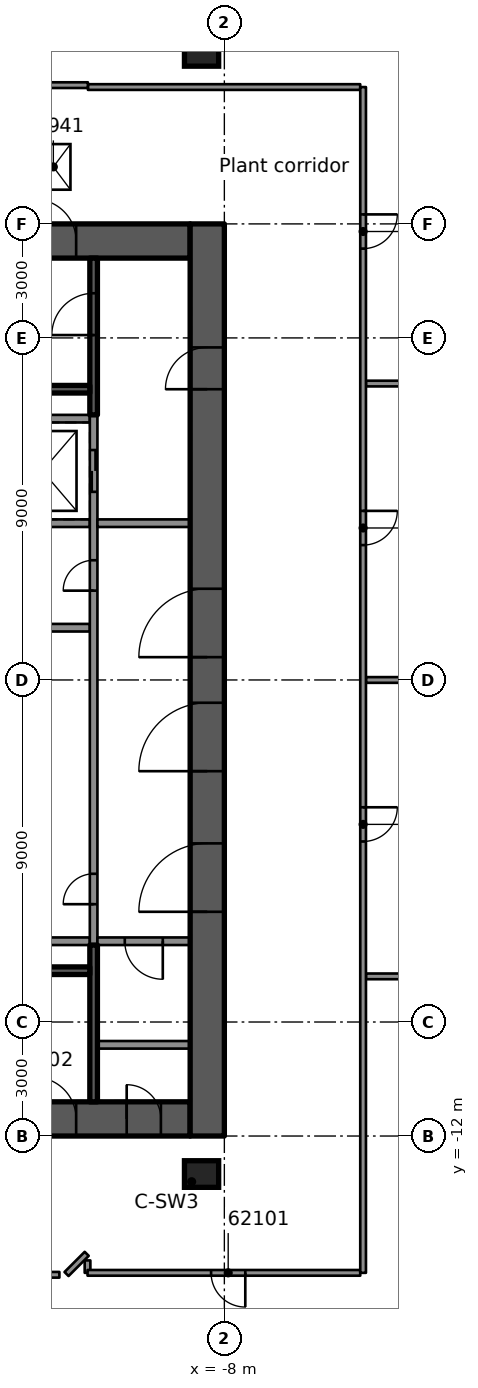
"""IFC4 building model, lengths in metres.
Left out: names, types, materials, properties, quantities, classifications, styles, units other than length and angle.
Written with IfcOpenShell. Run it as: python <this file> out.ifc"""

import sys

from ifc_helpers import new_model, si_unit, direction, frame, frame_2d, origin, origin_2d, place, context, subcontext, project, spatial, rectangle, extrude, element, fill, save


model = new_model("IFC4")
c1 = context("Model", 3, precision=1e-05, world=origin(), true_north=direction((0.0, 1.0)))
c2 = subcontext(c1, "Body", "Model", "MODEL_VIEW")
j1 = project(units=[si_unit("LENGTHUNIT", "METRE"), si_unit("PLANEANGLEUNIT", "RADIAN")], contexts=[c1])
p1 = place(None, origin())
s1 = spatial("IfcSite", under=j1, at=p1, CompositionType="ELEMENT")
p2 = place(p1, origin())
s2 = spatial("IfcBuilding", under=s1, at=p2, CompositionType="ELEMENT")
p3 = place(p2, frame((0.0, 0.0, 299.9)))
s3 = spatial("IfcBuildingStorey", under=s2, at=p3, CompositionType="ELEMENT", Elevation=299.9)
p4 = place(p3, frame((-18.1, 11.55, 0.0), z_axis=(0.0, 0.0, 1.0), x_axis=(1.0, 0.0, 0.0)))
e1 = element("IfcWall", 1, at=p4, inside=s3, PredefinedType="SHEAR", context=c2, shape_type="SweptSolid", body=[
    extrude(rectangle(XDim=9.2, YDim=0.9, at=frame_2d((4.6, 0.0))), origin(), (0.0, 0.0, 1.0), 4.4),
])
p5 = place(p4, frame((5.1, 0.0, 0.0)))
e2 = element("IfcOpeningElement", 2, at=p5, cuts=e1, PredefinedType="OPENING", context=c2, shape_type="SweptSolid", body=[
    extrude(rectangle(XDim=1.1, YDim=2.1, at=frame_2d((0.55, 1.05))), frame((0.0, 0.46, 0.0), z_axis=(0.0, -1.0, 0.0), x_axis=(1.0, 0.0, 0.0)), (0.0, 0.0, 1.0), 0.92),
])
p6 = place(p3, frame((-18.1, -11.55, 0.0), z_axis=(0.0, 0.0, 1.0), x_axis=(1.0, 0.0, 0.0)))
e3 = element("IfcWall", 3, at=p6, inside=s3, PredefinedType="SHEAR", context=c2, shape_type="SweptSolid", body=[
    extrude(rectangle(XDim=9.2, YDim=0.9, at=frame_2d((4.6, 0.0))), origin(), (0.0, 0.0, 1.0), 4.4),
])
p7 = place(p6, frame((5.1, 0.0, 0.0)))
e4 = element("IfcOpeningElement", 4, at=p7, cuts=e3, PredefinedType="OPENING", context=c2, shape_type="SweptSolid", body=[
    extrude(rectangle(XDim=1.1, YDim=2.1, at=frame_2d((0.55, 1.05))), frame((0.0, 0.46, 0.0), z_axis=(0.0, -1.0, 0.0), x_axis=(1.0, 0.0, 0.0)), (0.0, 0.0, 1.0), 0.92),
])
p8 = place(p6, frame((7.53, 0.0, 0.0)))
e5 = element("IfcOpeningElement", 5, at=p8, cuts=e3, PredefinedType="OPENING", context=c2, shape_type="SweptSolid", body=[
    extrude(rectangle(XDim=0.9, YDim=2.1, at=frame_2d((0.45, 1.05))), frame((0.0, 0.46, 0.0), z_axis=(0.0, -1.0, 0.0), x_axis=(1.0, 0.0, 0.0)), (0.0, 0.0, 1.0), 0.92),
])
p9 = place(p3, frame((-8.45, -12.0, 0.0), z_axis=(0.0, 0.0, 1.0), x_axis=(0.0, 1.0, 0.0)))
e6 = element("IfcWall", 6, at=p9, inside=s3, PredefinedType="SHEAR", context=c2, shape_type="SweptSolid", body=[
    extrude(rectangle(XDim=24.0, YDim=0.9, at=frame_2d((12.0, 0.0))), origin(), (0.0, 0.0, 1.0), 4.4),
])
p10 = place(p9, frame((9.6, 0.0, 0.0)))
e7 = element("IfcOpeningElement", 7, at=p10, cuts=e6, PredefinedType="OPENING", context=c2, shape_type="SweptSolid", body=[
    extrude(rectangle(XDim=1.8, YDim=2.1, at=frame_2d((0.9, 1.05))), frame((0.0, 0.46, 0.0), z_axis=(0.0, -1.0, 0.0), x_axis=(1.0, 0.0, 0.0)), (0.0, 0.0, 1.0), 0.92),
])
p11 = place(p9, frame((5.9, 0.0, 0.0)))
e8 = element("IfcOpeningElement", 8, at=p11, cuts=e6, PredefinedType="OPENING", context=c2, shape_type="SweptSolid", body=[
    extrude(rectangle(XDim=1.8, YDim=2.1, at=frame_2d((0.9, 1.05))), frame((0.0, 0.46, 0.0), z_axis=(0.0, -1.0, 0.0), x_axis=(1.0, 0.0, 0.0)), (0.0, 0.0, 1.0), 0.92),
])
p12 = place(p9, frame((12.6, 0.0, 0.0)))
e9 = element("IfcOpeningElement", 9, at=p12, cuts=e6, PredefinedType="OPENING", context=c2, shape_type="SweptSolid", body=[
    extrude(rectangle(XDim=1.8, YDim=2.1, at=frame_2d((0.9, 1.05))), frame((0.0, 0.46, 0.0), z_axis=(0.0, -1.0, 0.0), x_axis=(1.0, 0.0, 0.0)), (0.0, 0.0, 1.0), 0.92),
])
p13 = place(p9, frame((19.65, 0.0, 0.0)))
e10 = element("IfcOpeningElement", 10, at=p13, cuts=e6, PredefinedType="OPENING", context=c2, shape_type="SweptSolid", body=[
    extrude(rectangle(XDim=1.1, YDim=2.1, at=frame_2d((0.55, 1.05))), frame((0.0, 0.46, 0.0), z_axis=(0.0, -1.0, 0.0), x_axis=(1.0, 0.0, 0.0)), (0.0, 0.0, 1.0), 0.92),
])
for number, where, z_axis, x_axis in (
    (11, (-8.6, 16.5, 0.0), (0.0, 0.0, 1.0), (1.0, 0.0, 0.0)),
    (12, (-8.6, -13.0, 0.0), (0.0, 0.0, 1.0), (1.0, 0.0, 0.0)),
):
    element("IfcColumn", number, at=place(p3, frame(where, z_axis=z_axis, x_axis=x_axis)), inside=s3, PredefinedType="COLUMN", context=c2, shape_type="SweptSolid", body=[
        extrude(rectangle(XDim=0.9, YDim=0.7, at=origin_2d()), origin(), (0.0, 0.0, 1.0), 4.4),
    ])
for number, where, z_axis, x_axis in (
    (13, (-11.54, 6.875, 0.0), (0.0, 0.0, 1.0), (-1.0, 0.0, 0.0)),
    (14, (-11.54, -6.875, 0.0), (0.0, 0.0, 1.0), (-1.0, 0.0, 0.0)),
):
    element("IfcWall", number, at=place(p3, frame(where, z_axis=z_axis, x_axis=x_axis)), inside=s3, PredefinedType="SOLIDWALL", context=c2, shape_type="SweptSolid", body=[
        extrude(rectangle(XDim=6.56, YDim=0.2, at=frame_2d((3.28, 0.0))), origin(), (0.0, 0.0, 1.0), 3.98),
    ])
p14 = place(p3, frame((-11.54, 1.375, 0.0), z_axis=(0.0, 0.0, 1.0), x_axis=(-1.0, 0.0, 0.0)))
e15 = element("IfcWall", 15, at=p14, inside=s3, PredefinedType="SOLIDWALL", context=c2, shape_type="SweptSolid", body=[
    extrude(rectangle(XDim=4.2, YDim=0.2, at=frame_2d((2.1, 0.0))), origin(), (0.0, 0.0, 1.0), 3.98),
])
p15 = place(p3, frame((-11.54, 4.125, 0.0), z_axis=(0.0, 0.0, 1.0), x_axis=(-1.0, 0.0, 0.0)))
e16 = element("IfcWall", 16, at=p15, inside=s3, PredefinedType="SOLIDWALL", context=c2, shape_type="SweptSolid", body=[
    extrude(rectangle(XDim=2.5, YDim=0.2, at=frame_2d((1.25, 0.0))), origin(), (0.0, 0.0, 1.0), 3.98),
])
p16 = place(p3, frame((-11.44, -6.975, 0.0), z_axis=(0.0, 0.0, 1.0), x_axis=(0.0, 1.0, 0.0)))
e17 = element("IfcWall", 17, at=p16, inside=s3, PredefinedType="SOLIDWALL", context=c2, shape_type="SweptSolid", body=[
    extrude(rectangle(XDim=13.95, YDim=0.2, at=frame_2d((6.975, 0.0))), origin(), (0.0, 0.0, 1.0), 3.98),
])
p17 = place(p16, frame((11.925, 0.0, 0.0)))
e18 = element("IfcOpeningElement", 18, at=p17, cuts=e17, PredefinedType="OPENING", context=c2, shape_type="SweptSolid", body=[
    extrude(rectangle(XDim=1.1, YDim=2.1, at=frame_2d((0.55, 1.05))), frame((0.0, 0.11, 0.0), z_axis=(0.0, -1.0, 0.0), x_axis=(1.0, 0.0, 0.0)), (0.0, 0.0, 1.0), 0.22),
])
p18 = place(p16, frame((1.075, 0.0, 0.0)))
e19 = element("IfcOpeningElement", 19, at=p18, cuts=e17, PredefinedType="OPENING", context=c2, shape_type="SweptSolid", body=[
    extrude(rectangle(XDim=0.8, YDim=2.1, at=frame_2d((0.4, 1.05))), frame((0.0, 0.11, 0.0), z_axis=(0.0, -1.0, 0.0), x_axis=(1.0, 0.0, 0.0)), (0.0, 0.0, 1.0), 0.22),
])
p19 = place(p16, frame((9.325, 0.0, 0.0)))
e20 = element("IfcOpeningElement", 20, at=p19, cuts=e17, PredefinedType="OPENING", context=c2, shape_type="SweptSolid", body=[
    extrude(rectangle(XDim=0.8, YDim=2.1, at=frame_2d((0.4, 1.05))), frame((0.0, 0.11, 0.0), z_axis=(0.0, -1.0, 0.0), x_axis=(1.0, 0.0, 0.0)), (0.0, 0.0, 1.0), 0.22),
])
p20 = place(p3, frame((-11.44, 6.975, 0.0), z_axis=(0.0, 0.0, 1.0), x_axis=(0.0, 1.0, 0.0)))
e21 = element("IfcWall", 21, at=p20, inside=s3, PredefinedType="SOLIDWALL", context=c2, shape_type="SweptSolid", body=[
    extrude(rectangle(XDim=4.125, YDim=0.2, at=frame_2d((2.062, 0.0))), origin(), (0.0, 0.0, 1.0), 3.98),
])
p21 = place(p20, frame((2.1, 0.0, 0.0)))
e22 = element("IfcOpeningElement", 22, at=p21, cuts=e21, PredefinedType="OPENING", context=c2, shape_type="SweptSolid", body=[
    extrude(rectangle(XDim=1.1, YDim=2.1, at=frame_2d((0.55, 1.05))), frame((0.0, 0.11, 0.0), z_axis=(0.0, -1.0, 0.0), x_axis=(1.0, 0.0, 0.0)), (0.0, 0.0, 1.0), 0.22),
])
p22 = place(p3, frame((-11.54, 7.65, 0.0), z_axis=(0.0, 0.0, 1.0), x_axis=(-1.0, 0.0, 0.0)))
e23 = element("IfcWall", 23, at=p22, inside=s3, PredefinedType="SOLIDWALL", context=c2, shape_type="SweptSolid", body=[
    extrude(rectangle(XDim=6.56, YDim=0.2, at=frame_2d((3.28, 0.0))), origin(), (0.0, 0.0, 1.0), 3.98),
])
p23 = place(p3, frame((-11.44, -11.1, 0.0), z_axis=(0.0, 0.0, 1.0), x_axis=(0.0, 1.0, 0.0)))
e24 = element("IfcWall", 24, at=p23, inside=s3, PredefinedType="SOLIDWALL", context=c2, shape_type="SweptSolid", body=[
    extrude(rectangle(XDim=4.125, YDim=0.2, at=frame_2d((2.062, 0.0))), origin(), (0.0, 0.0, 1.0), 3.98),
])
p24 = place(p3, frame((-11.54, -7.65, 0.0), z_axis=(0.0, 0.0, 1.0), x_axis=(-1.0, 0.0, 0.0)))
e25 = element("IfcWall", 25, at=p24, inside=s3, PredefinedType="SOLIDWALL", context=c2, shape_type="SweptSolid", body=[
    extrude(rectangle(XDim=6.56, YDim=0.2, at=frame_2d((3.28, 0.0))), origin(), (0.0, 0.0, 1.0), 3.98),
])
p25 = place(p3, frame((-8.9, 4.125, 0.0), z_axis=(0.0, 0.0, 1.0), x_axis=(-1.0, 0.0, 0.0)))
e26 = element("IfcWall", 26, at=p25, inside=s3, PredefinedType="PARTITIONING", context=c2, shape_type="SweptSolid", body=[
    extrude(rectangle(XDim=2.44, YDim=0.2, at=frame_2d((1.22, 0.0))), origin(), (0.0, 0.0, 1.0), 3.98),
])
p26 = place(p3, frame((-8.9, -6.875, 0.0), z_axis=(0.0, 0.0, 1.0), x_axis=(-1.0, 0.0, 0.0)))
e27 = element("IfcWall", 27, at=p26, inside=s3, PredefinedType="PARTITIONING", context=c2, shape_type="SweptSolid", body=[
    extrude(rectangle(XDim=2.44, YDim=0.2, at=frame_2d((1.22, 0.0))), origin(), (0.0, 0.0, 1.0), 3.98),
])
p27 = place(p26, frame((0.72, 0.0, 0.0)))
e28 = element("IfcOpeningElement", 28, at=p27, cuts=e27, PredefinedType="OPENING", context=c2, shape_type="SweptSolid", body=[
    extrude(rectangle(XDim=1.0, YDim=2.1, at=frame_2d((0.5, 1.05))), frame((0.0, 0.11, 0.0), z_axis=(0.0, -1.0, 0.0), x_axis=(1.0, 0.0, 0.0)), (0.0, 0.0, 1.0), 0.22),
])
p28 = place(p3, frame((-8.9, -9.6, 0.0), z_axis=(0.0, 0.0, 1.0), x_axis=(-1.0, 0.0, 0.0)))
e29 = element("IfcWall", 29, at=p28, inside=s3, PredefinedType="PARTITIONING", context=c2, shape_type="SweptSolid", body=[
    extrude(rectangle(XDim=2.44, YDim=0.2, at=frame_2d((1.22, 0.0))), origin(), (0.0, 0.0, 1.0), 3.98),
])
p29 = place(p3, frame((-11.601, -15.273, 0.0), z_axis=(0.0, 0.0, 1.0), x_axis=(0.002985061327, -0.999995544695, 0.0)))
e30 = element("IfcWall", 30, at=p29, inside=s3, PredefinedType="PARTITIONING", context=c2, shape_type="SweptSolid", body=[
    extrude(rectangle(XDim=0.327, YDim=0.15, at=frame_2d((0.164, 0.0))), origin(), (0.0, 0.0, 1.0), 3.98),
])
p30 = place(p3, frame((-22.575, -15.651, 0.0), z_axis=(0.0, 0.0, 1.0), x_axis=(1.0, 0.0, 0.0)))
e31 = element("IfcWall", 31, at=p30, inside=s3, PredefinedType="PARTITIONING", context=c2, shape_type="SweptSolid", body=[
    extrude(rectangle(XDim=10.234, YDim=0.15, at=frame_2d((5.117, 0.0))), origin(), (0.0, 0.0, 1.0), 3.98),
])
p31 = place(p3, frame((-4.424, -15.6, 0.0), z_axis=(0.0, 0.0, 1.0), x_axis=(-1.0, 0.0, 0.0)))
e32 = element("IfcWall", 32, at=p31, inside=s3, PredefinedType="PARTITIONING", context=c2, shape_type="SweptSolid", body=[
    extrude(rectangle(XDim=7.176, YDim=0.15, at=frame_2d((3.588, 0.0))), origin(), (0.0, 0.0, 1.0), 3.98),
])
p32 = place(p31, frame((3.025, 0.0, 0.0)))
e33 = element("IfcOpeningElement", 33, at=p32, cuts=e32, PredefinedType="OPENING", context=c2, shape_type="SweptSolid", body=[
    extrude(rectangle(XDim=0.9, YDim=2.1, at=frame_2d((0.45, 1.05))), frame((0.0, 0.085, 0.0), z_axis=(0.0, -1.0, 0.0), x_axis=(1.0, 0.0, 0.0)), (0.0, 0.0, 1.0), 0.17),
])
for number, where, z_axis, x_axis in (
    (34, (-4.274, -7.799, 0.0), (0.0, 0.0, 1.0), (1.0, 0.0, 0.0)),
    (35, (-4.274, 0.0, 0.0), (0.0, 0.0, 1.0), (1.0, 0.0, 0.0)),
    (36, (-4.274, 7.799, 0.0), (0.0, 0.0, 1.0), (1.0, 0.0, 0.0)),
):
    element("IfcWall", number, at=place(p3, frame(where, z_axis=z_axis, x_axis=x_axis)), inside=s3, PredefinedType="PARTITIONING", context=c2, shape_type="SweptSolid", body=[
        extrude(rectangle(XDim=8.549, YDim=0.15, at=frame_2d((4.274, 0.0))), origin(), (0.0, 0.0, 1.0), 3.98),
    ])
p33 = place(p3, frame((-11.59, 15.601, 0.0), z_axis=(0.0, 0.0, 1.0), x_axis=(1.0, 0.0, 0.0)))
e37 = element("IfcWall", 37, at=p33, inside=s3, PredefinedType="PARTITIONING", context=c2, shape_type="SweptSolid", body=[
    extrude(rectangle(XDim=7.165, YDim=0.15, at=frame_2d((3.583, 0.0))), origin(), (0.0, 0.0, 1.0), 3.98),
])
p34 = place(p3, frame((-22.575, 15.651, 0.0), z_axis=(0.0, 0.0, 1.0), x_axis=(1.0, 0.0, 0.0)))
e38 = element("IfcWall", 38, at=p34, inside=s3, PredefinedType="PARTITIONING", context=c2, shape_type="SweptSolid", body=[
    extrude(rectangle(XDim=10.984, YDim=0.15, at=frame_2d((5.492, 0.0))), origin(), (0.0, 0.0, 1.0), 3.98),
])
p35 = place(p34, frame((4.926, 0.0, 0.0)))
e39 = element("IfcOpeningElement", 39, at=p35, cuts=e38, PredefinedType="OPENING", context=c2, shape_type="SweptSolid", body=[
    extrude(rectangle(XDim=1.1, YDim=2.1, at=frame_2d((0.55, 1.05))), frame((0.0, 0.085, 0.0), z_axis=(0.0, -1.0, 0.0), x_axis=(1.0, 0.0, 0.0)), (0.0, 0.0, 1.0), 0.17),
])
p36 = place(p3, frame((-12.153, -15.631, 0.0), z_axis=(0.0, 0.0, 1.0), x_axis=(0.707106781187, 0.707106781187, 0.0)))
e40 = element("IfcWall", 40, at=p36, inside=s3, PredefinedType="PARTITIONING", context=c2, shape_type="SweptSolid", body=[
    extrude(rectangle(XDim=0.751, YDim=0.15, at=frame_2d((0.375, 0.0))), origin(), (0.0, 0.0, 1.0), 3.98),
])
p37 = place(p3, frame((-4.349, 15.6, 0.0), z_axis=(0.0, 0.0, 1.0), x_axis=(0.0, -1.0, 0.0)))
e41 = element("IfcWall", 41, at=p37, inside=s3, PredefinedType="PARTITIONING", context=c2, shape_type="SweptSolid", body=[
    extrude(rectangle(XDim=31.2, YDim=0.15, at=frame_2d((15.6, 0.0))), origin(), (0.0, 0.0, 1.0), 3.98),
])
p38 = place(p37, frame((18.95, 0.0, 0.0)))
e42 = element("IfcOpeningElement", 42, at=p38, cuts=e41, PredefinedType="OPENING", context=c2, shape_type="SweptSolid", body=[
    extrude(rectangle(XDim=0.9, YDim=2.1, at=frame_2d((0.45, 1.05))), frame((0.0, 0.085, 0.0), z_axis=(0.0, -1.0, 0.0), x_axis=(1.0, 0.0, 0.0)), (0.0, 0.0, 1.0), 0.17),
])
p39 = place(p37, frame((11.151, 0.0, 0.0)))
e43 = element("IfcOpeningElement", 43, at=p39, cuts=e41, PredefinedType="OPENING", context=c2, shape_type="SweptSolid", body=[
    extrude(rectangle(XDim=0.9, YDim=2.1, at=frame_2d((0.45, 1.05))), frame((0.0, 0.085, 0.0), z_axis=(0.0, -1.0, 0.0), x_axis=(1.0, 0.0, 0.0)), (0.0, 0.0, 1.0), 0.17),
])
p40 = place(p37, frame((3.35, 0.0, 0.0)))
e44 = element("IfcOpeningElement", 44, at=p40, cuts=e41, PredefinedType="OPENING", context=c2, shape_type="SweptSolid", body=[
    extrude(rectangle(XDim=0.9, YDim=2.1, at=frame_2d((0.45, 1.05))), frame((0.0, 0.085, 0.0), z_axis=(0.0, -1.0, 0.0), x_axis=(1.0, 0.0, 0.0)), (0.0, 0.0, 1.0), 0.17),
])
p41 = place(p17, origin())
e45 = element("IfcDoor", 45, at=p41, inside=s3, OperationType="DOUBLE_DOOR_SLIDING", PredefinedType="DOOR", context=c2, shape_type="SweptSolid", body=[
    extrude(rectangle(XDim=1.1, YDim=2.1, at=frame_2d((0.55, 1.05))), frame((0.0, 0.025, 0.0), z_axis=(0.0, -1.0, 0.0), x_axis=(1.0, 0.0, 0.0)), (0.0, 0.0, 1.0), 0.05),
])
fill(e18, e45)
p42 = place(p18, origin())
e46 = element("IfcDoor", 46, at=p42, inside=s3, OperationType="SINGLE_SWING_LEFT", PredefinedType="DOOR", context=c2, shape_type="SweptSolid", body=[
    extrude(rectangle(XDim=0.8, YDim=2.1, at=frame_2d((0.4, 1.05))), frame((0.0, 0.025, 0.0), z_axis=(0.0, -1.0, 0.0), x_axis=(1.0, 0.0, 0.0)), (0.0, 0.0, 1.0), 0.05),
])
fill(e19, e46)
p43 = place(p19, origin())
e47 = element("IfcDoor", 47, at=p43, inside=s3, OperationType="SINGLE_SWING_LEFT", PredefinedType="DOOR", context=c2, shape_type="SweptSolid", body=[
    extrude(rectangle(XDim=0.8, YDim=2.1, at=frame_2d((0.4, 1.05))), frame((0.0, 0.025, 0.0), z_axis=(0.0, -1.0, 0.0), x_axis=(1.0, 0.0, 0.0)), (0.0, 0.0, 1.0), 0.05),
])
fill(e20, e47)
p44 = place(p10, origin())
e48 = element("IfcDoor", 48, at=p44, inside=s3, OperationType="SINGLE_SWING_LEFT", PredefinedType="DOOR", context=c2, shape_type="SweptSolid", body=[
    extrude(rectangle(XDim=1.8, YDim=2.1, at=frame_2d((0.9, 1.05))), frame((0.0, 0.025, 0.0), z_axis=(0.0, -1.0, 0.0), x_axis=(1.0, 0.0, 0.0)), (0.0, 0.0, 1.0), 0.05),
])
fill(e7, e48)
p45 = place(p11, origin())
e49 = element("IfcDoor", 49, at=p45, inside=s3, OperationType="SINGLE_SWING_LEFT", PredefinedType="DOOR", context=c2, shape_type="SweptSolid", body=[
    extrude(rectangle(XDim=1.8, YDim=2.1, at=frame_2d((0.9, 1.05))), frame((0.0, 0.025, 0.0), z_axis=(0.0, -1.0, 0.0), x_axis=(1.0, 0.0, 0.0)), (0.0, 0.0, 1.0), 0.05),
])
fill(e8, e49)
p46 = place(p12, origin())
e50 = element("IfcDoor", 50, at=p46, inside=s3, OperationType="SINGLE_SWING_RIGHT", PredefinedType="DOOR", context=c2, shape_type="SweptSolid", body=[
    extrude(rectangle(XDim=1.8, YDim=2.1, at=frame_2d((0.9, 1.05))), frame((0.0, 0.025, 0.0), z_axis=(0.0, -1.0, 0.0), x_axis=(1.0, 0.0, 0.0)), (0.0, 0.0, 1.0), 0.05),
])
fill(e9, e50)
p47 = place(p13, origin())
e51 = element("IfcDoor", 51, at=p47, inside=s3, OperationType="SINGLE_SWING_RIGHT", PredefinedType="DOOR", context=c2, shape_type="SweptSolid", body=[
    extrude(rectangle(XDim=1.1, YDim=2.1, at=frame_2d((0.55, 1.05))), frame((0.0, 0.025, 0.0), z_axis=(0.0, -1.0, 0.0), x_axis=(1.0, 0.0, 0.0)), (0.0, 0.0, 1.0), 0.05),
])
fill(e10, e51)
p48 = place(p5, origin())
e52 = element("IfcDoor", 52, at=p48, inside=s3, OperationType="SINGLE_SWING_RIGHT", PredefinedType="DOOR", context=c2, shape_type="SweptSolid", body=[
    extrude(rectangle(XDim=1.1, YDim=2.1, at=frame_2d((0.55, 1.05))), frame((0.0, 0.025, 0.0), z_axis=(0.0, -1.0, 0.0), x_axis=(1.0, 0.0, 0.0)), (0.0, 0.0, 1.0), 0.05),
])
fill(e2, e52)
p49 = place(p7, origin())
e53 = element("IfcDoor", 53, at=p49, inside=s3, OperationType="SINGLE_SWING_RIGHT", PredefinedType="DOOR", context=c2, shape_type="SweptSolid", body=[
    extrude(rectangle(XDim=1.1, YDim=2.1, at=frame_2d((0.55, 1.05))), frame((0.0, 0.025, 0.0), z_axis=(0.0, -1.0, 0.0), x_axis=(1.0, 0.0, 0.0)), (0.0, 0.0, 1.0), 0.05),
])
fill(e4, e53)
p50 = place(p21, origin())
e54 = element("IfcDoor", 54, at=p50, inside=s3, OperationType="SINGLE_SWING_RIGHT", PredefinedType="DOOR", context=c2, shape_type="SweptSolid", body=[
    extrude(rectangle(XDim=1.1, YDim=2.1, at=frame_2d((0.55, 1.05))), frame((0.0, 0.025, 0.0), z_axis=(0.0, -1.0, 0.0), x_axis=(1.0, 0.0, 0.0)), (0.0, 0.0, 1.0), 0.05),
])
fill(e22, e54)
p51 = place(p8, origin())
e55 = element("IfcDoor", 55, at=p51, inside=s3, OperationType="SINGLE_SWING_RIGHT", PredefinedType="DOOR", context=c2, shape_type="SweptSolid", body=[
    extrude(rectangle(XDim=0.9, YDim=2.1, at=frame_2d((0.45, 1.05))), frame((0.0, 0.025, 0.0), z_axis=(0.0, -1.0, 0.0), x_axis=(1.0, 0.0, 0.0)), (0.0, 0.0, 1.0), 0.05),
])
fill(e5, e55)
p52 = place(p27, origin())
e56 = element("IfcDoor", 56, at=p52, inside=s3, OperationType="SINGLE_SWING_RIGHT", PredefinedType="DOOR", context=c2, shape_type="SweptSolid", body=[
    extrude(rectangle(XDim=1.0, YDim=2.1, at=frame_2d((0.5, 1.05))), frame((0.0, 0.025, 0.0), z_axis=(0.0, -1.0, 0.0), x_axis=(1.0, 0.0, 0.0)), (0.0, 0.0, 1.0), 0.05),
])
fill(e28, e56)
p53 = place(p2, frame((0.0, 0.0, 304.3)))
p54 = place(p53, frame((0.0, 0.0, -0.42)))
p55 = place(p54, frame((-12.5, 13.5, 0.0)))
p56 = place(p55, origin())
e57 = element("IfcDoor", 57, at=p56, inside=s3, OperationType="SINGLE_SWING_LEFT", PredefinedType="TRAPDOOR", context=c2, shape_type="SweptSolid", body=[
    extrude(rectangle(XDim=0.9, YDim=1.2, at=origin_2d()), origin(), (0.0, 0.0, 1.0), 0.42),
])
p57 = place(p32, origin())
e58 = element("IfcDoor", 58, at=p57, inside=s3, OperationType="SINGLE_SWING_LEFT", PredefinedType="DOOR", context=c2, shape_type="SweptSolid", body=[
    extrude(rectangle(XDim=0.9, YDim=2.1, at=frame_2d((0.45, 1.05))), frame((0.0, 0.025, 0.0), z_axis=(0.0, -1.0, 0.0), x_axis=(1.0, 0.0, 0.0)), (0.0, 0.0, 1.0), 0.05),
])
fill(e33, e58)
p58 = place(p38, origin())
e59 = element("IfcDoor", 59, at=p58, inside=s3, OperationType="SINGLE_SWING_RIGHT", PredefinedType="DOOR", context=c2, shape_type="SweptSolid", body=[
    extrude(rectangle(XDim=0.9, YDim=2.1, at=frame_2d((0.45, 1.05))), frame((0.0, 0.025, 0.0), z_axis=(0.0, -1.0, 0.0), x_axis=(1.0, 0.0, 0.0)), (0.0, 0.0, 1.0), 0.05),
])
fill(e42, e59)
p59 = place(p39, origin())
e60 = element("IfcDoor", 60, at=p59, inside=s3, OperationType="SINGLE_SWING_LEFT", PredefinedType="DOOR", context=c2, shape_type="SweptSolid", body=[
    extrude(rectangle(XDim=0.9, YDim=2.1, at=frame_2d((0.45, 1.05))), frame((0.0, 0.025, 0.0), z_axis=(0.0, -1.0, 0.0), x_axis=(1.0, 0.0, 0.0)), (0.0, 0.0, 1.0), 0.05),
])
fill(e43, e60)
p60 = place(p40, origin())
e61 = element("IfcDoor", 61, at=p60, inside=s3, OperationType="SINGLE_SWING_LEFT", PredefinedType="DOOR", context=c2, shape_type="SweptSolid", body=[
    extrude(rectangle(XDim=0.9, YDim=2.1, at=frame_2d((0.45, 1.05))), frame((0.0, 0.025, 0.0), z_axis=(0.0, -1.0, 0.0), x_axis=(1.0, 0.0, 0.0)), (0.0, 0.0, 1.0), 0.05),
])
fill(e44, e61)
save(model, sys.argv[1])
